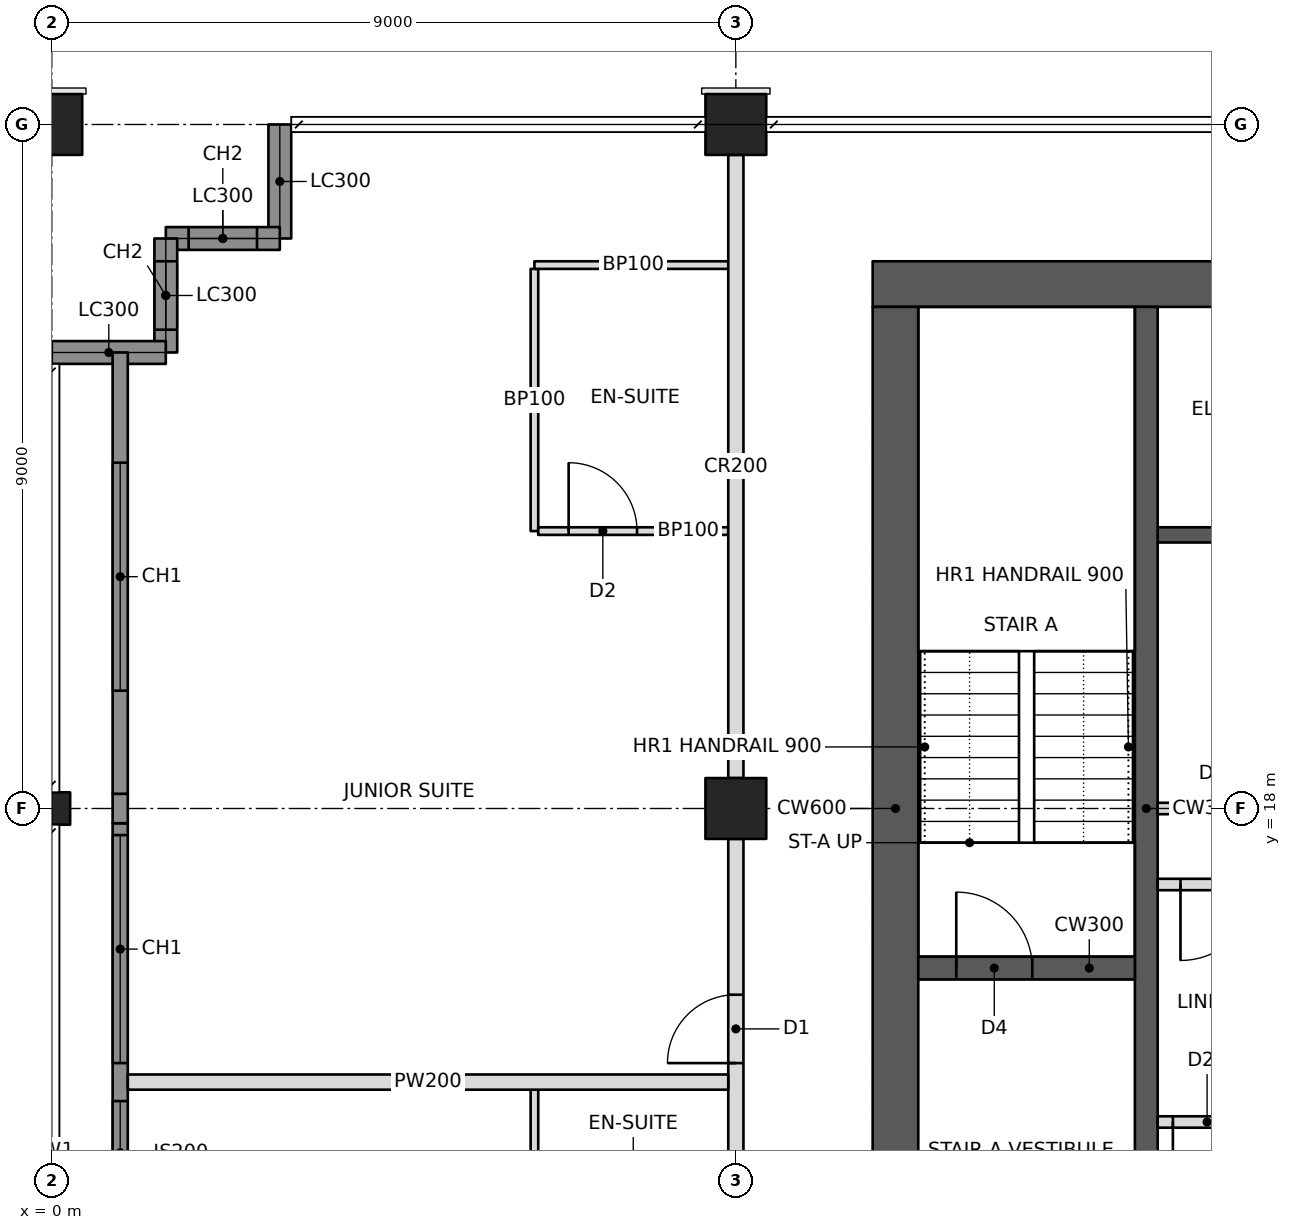
"""IFC4 building model, lengths in metres.
Left out: names, types, materials, properties, quantities, classifications, styles, units other than length and angle.
Written with IfcOpenShell. Run it as: python <this file> out.ifc"""

import sys

from ifc_helpers import new_model, si_unit, direction, frame, frame_2d, origin, origin_2d, place, context, subcontext, project, spatial, rectangle, hollow_rectangle, i_section, extrude, element, fill, save


model = new_model("IFC4")
c1 = context("Model", 3, precision=1e-05, world=origin(), true_north=direction((0.0, 1.0)))
c2 = subcontext(c1, "Body", "Model", "MODEL_VIEW")
j1 = project(units=[si_unit("LENGTHUNIT", "METRE"), si_unit("PLANEANGLEUNIT", "RADIAN")], contexts=[c1])
p1 = place(None, origin())
s1 = spatial("IfcSite", under=j1, at=p1, CompositionType="ELEMENT")
p2 = place(p1, origin())
s2 = spatial("IfcBuilding", under=s1, at=p2, CompositionType="ELEMENT")
p3 = place(p2, frame((0.0, 0.0, 204.6)))
s3 = spatial("IfcBuildingStorey", under=s2, at=p3, CompositionType="ELEMENT", Elevation=204.6)
p4 = place(p3, frame((0.0, 18.0, 0.0), z_axis=(0.0, 0.0, 1.0), x_axis=(0.0, 1.0, 0.0)))
e1 = element("IfcColumn", 1, at=p4, inside=s3, PredefinedType="COLUMN", context=c2, shape_type="SweptSolid", body=[
    extrude(i_section(OverallWidth=0.427, OverallDepth=0.483, WebThickness=0.051, FlangeThickness=0.082, at=origin_2d()), origin(), (0.0, 0.0, 1.0), 3.4),
])
p5 = place(p3, frame((0.0, 27.0, 0.0), z_axis=(0.0, 0.0, 1.0), x_axis=(0.0, 1.0, 0.0)))
e2 = element("IfcColumn", 2, at=p5, inside=s3, PredefinedType="COLUMN", context=c2, shape_type="SweptSolid", body=[
    extrude(hollow_rectangle(XDim=0.8, YDim=0.8, WallThickness=0.06, at=origin_2d()), origin(), (0.0, 0.0, 1.0), 3.4),
])
p6 = place(p3, frame((9.0, 18.0, 0.0), z_axis=(0.0, 0.0, 1.0), x_axis=(1.0, 0.0, 0.0)))
e3 = element("IfcColumn", 3, at=p6, inside=s3, PredefinedType="COLUMN", context=c2, shape_type="SweptSolid", body=[
    extrude(hollow_rectangle(XDim=0.8, YDim=0.8, WallThickness=0.05, at=origin_2d()), origin(), (0.0, 0.0, 1.0), 3.4),
])
p7 = place(p3, frame((9.0, 27.0, 0.0), z_axis=(0.0, 0.0, 1.0), x_axis=(1.0, 0.0, 0.0)))
e4 = element("IfcColumn", 4, at=p7, inside=s3, PredefinedType="COLUMN", context=c2, shape_type="SweptSolid", body=[
    extrude(hollow_rectangle(XDim=0.8, YDim=0.8, WallThickness=0.06, at=origin_2d()), origin(), (0.0, 0.0, 1.0), 3.4),
])
p8 = place(p3, frame((10.8, 24.9, 0.0), z_axis=(0.0, 0.0, 1.0), x_axis=(1.0, 0.0, 0.0)))
e5 = element("IfcWall", 5, at=p8, inside=s3, PredefinedType="SHEAR", context=c2, shape_type="SweptSolid", body=[
    extrude(rectangle(XDim=23.4, YDim=0.6, at=frame_2d((11.7, 0.0))), origin(), (0.0, 0.0, 1.0), 3.4),
])
p9 = place(p8, frame((17.2, 0.0, 0.0)))
e6 = element("IfcOpeningElement", 6, at=p9, cuts=e5, PredefinedType="OPENING", context=c2, shape_type="SweptSolid", body=[
    extrude(rectangle(XDim=1.8, YDim=2.1, at=frame_2d((0.9, 1.05))), frame((0.0, 0.31, 0.0), z_axis=(0.0, -1.0, 0.0), x_axis=(1.0, 0.0, 0.0)), (0.0, 0.0, 1.0), 0.62),
])
p10 = place(p8, frame((21.1, 0.0, 0.0)))
e7 = element("IfcOpeningElement", 7, at=p10, cuts=e5, PredefinedType="OPENING", context=c2, shape_type="SweptSolid", body=[
    extrude(rectangle(XDim=1.0, YDim=2.1, at=frame_2d((0.5, 1.05))), frame((0.0, 0.31, 0.0), z_axis=(0.0, -1.0, 0.0), x_axis=(1.0, 0.0, 0.0)), (0.0, 0.0, 1.0), 0.62),
])
p11 = place(p8, frame((4.9, 0.0, 0.0)))
e8 = element("IfcOpeningElement", 8, at=p11, cuts=e5, PredefinedType="OPENING", context=c2, shape_type="SweptSolid", body=[
    extrude(rectangle(XDim=1.0, YDim=2.1, at=frame_2d((0.5, 1.05))), frame((0.0, 0.31, 0.0), z_axis=(0.0, -1.0, 0.0), x_axis=(1.0, 0.0, 0.0)), (0.0, 0.0, 1.0), 0.62),
])
p12 = place(p3, frame((11.1, 11.4, 0.0), z_axis=(0.0, 0.0, 1.0), x_axis=(0.0, 1.0, 0.0)))
e9 = element("IfcWall", 9, at=p12, inside=s3, PredefinedType="SHEAR", context=c2, shape_type="SweptSolid", body=[
    extrude(rectangle(XDim=13.2, YDim=0.6, at=frame_2d((6.6, 0.0))), origin(), (0.0, 0.0, 1.0), 3.4),
])
p13 = place(p3, frame((14.4, 11.4, 0.0), z_axis=(0.0, 0.0, 1.0), x_axis=(0.0, 1.0, 0.0)))
e10 = element("IfcWall", 10, at=p13, inside=s3, PredefinedType="SHEAR", context=c2, shape_type="SweptSolid", body=[
    extrude(rectangle(XDim=13.2, YDim=0.3, at=frame_2d((6.6, 0.0))), origin(), (0.0, 0.0, 1.0), 3.4),
])
p14 = place(p3, frame((11.4, 15.9, 0.0), z_axis=(0.0, 0.0, 1.0), x_axis=(1.0, 0.0, 0.0)))
e11 = element("IfcWall", 11, at=p14, inside=s3, PredefinedType="SHEAR", context=c2, shape_type="SweptSolid", body=[
    extrude(rectangle(XDim=2.85, YDim=0.3, at=frame_2d((1.425, 0.0))), origin(), (0.0, 0.0, 1.0), 3.4),
])
p15 = place(p14, frame((0.5, 0.0, 0.0)))
e12 = element("IfcOpeningElement", 12, at=p15, cuts=e11, PredefinedType="OPENING", context=c2, shape_type="SweptSolid", body=[
    extrude(rectangle(XDim=1.0, YDim=2.1, at=frame_2d((0.5, 1.05))), frame((0.0, 0.16, 0.0), z_axis=(0.0, -1.0, 0.0), x_axis=(1.0, 0.0, 0.0)), (0.0, 0.0, 1.0), 0.32),
])
p16 = place(p3, frame((14.55, 18.0, 0.0), z_axis=(0.0, 0.0, 1.0), x_axis=(1.0, 0.0, 0.0)))
e13 = element("IfcWall", 13, at=p16, inside=s3, PredefinedType="PARTITIONING", context=c2, shape_type="SweptSolid", body=[
    extrude(rectangle(XDim=3.3, YDim=0.15, at=frame_2d((1.65, 0.0))), origin(), (0.0, 0.0, 1.0), 3.2),
])
p17 = place(p3, frame((14.55, 21.6, 0.0), z_axis=(0.0, 0.0, 1.0), x_axis=(1.0, 0.0, 0.0)))
e14 = element("IfcWall", 14, at=p17, inside=s3, PredefinedType="SHEAR", context=c2, shape_type="SweptSolid", body=[
    extrude(rectangle(XDim=3.3, YDim=0.2, at=frame_2d((1.65, 0.0))), origin(), (0.0, 0.0, 1.0), 3.4),
])
p18 = place(p3, frame((3.0, 27.0, 0.0), z_axis=(0.0, 0.0, 1.0), x_axis=(0.0, -1.0, 0.0)))
e15 = element("IfcWall", 15, at=p18, inside=s3, PredefinedType="SOLIDWALL", context=c2, shape_type="SweptSolid", body=[
    extrude(rectangle(XDim=1.5, YDim=0.3, at=frame_2d((0.75, 0.0))), origin(), (0.0, 0.0, 1.0), 2.42),
])
p19 = place(p3, frame((3.0, 25.5, 0.0), z_axis=(0.0, 0.0, 1.0), x_axis=(-1.0, 0.0, 0.0)))
e16 = element("IfcWall", 16, at=p19, inside=s3, PredefinedType="SOLIDWALL", context=c2, shape_type="SweptSolid", body=[
    extrude(rectangle(XDim=1.5, YDim=0.3, at=frame_2d((0.75, 0.0))), origin(), (0.0, 0.0, 1.0), 3.2),
])
p20 = place(p19, frame((0.3, 0.0, 0.6)))
e17 = element("IfcOpeningElement", 17, at=p20, cuts=e16, PredefinedType="OPENING", context=c2, shape_type="SweptSolid", body=[
    extrude(rectangle(XDim=0.9, YDim=2.2, at=frame_2d((0.45, 1.1))), frame((0.0, 0.16, 0.0), z_axis=(0.0, -1.0, 0.0), x_axis=(1.0, 0.0, 0.0)), (0.0, 0.0, 1.0), 0.32),
])
p21 = place(p3, frame((1.5, 25.5, 0.0), z_axis=(0.0, 0.0, 1.0), x_axis=(0.0, -1.0, 0.0)))
e18 = element("IfcWall", 18, at=p21, inside=s3, PredefinedType="SOLIDWALL", context=c2, shape_type="SweptSolid", body=[
    extrude(rectangle(XDim=1.5, YDim=0.3, at=frame_2d((0.75, 0.0))), origin(), (0.0, 0.0, 1.0), 3.2),
])
p22 = place(p21, frame((0.3, 0.0, 0.6)))
e19 = element("IfcOpeningElement", 19, at=p22, cuts=e18, PredefinedType="OPENING", context=c2, shape_type="SweptSolid", body=[
    extrude(rectangle(XDim=0.9, YDim=2.2, at=frame_2d((0.45, 1.1))), frame((0.0, 0.16, 0.0), z_axis=(0.0, -1.0, 0.0), x_axis=(1.0, 0.0, 0.0)), (0.0, 0.0, 1.0), 0.32),
])
p23 = place(p3, frame((1.5, 24.0, 0.0), z_axis=(0.0, 0.0, 1.0), x_axis=(-1.0, 0.0, 0.0)))
e20 = element("IfcWall", 20, at=p23, inside=s3, PredefinedType="SOLIDWALL", context=c2, shape_type="SweptSolid", body=[
    extrude(rectangle(XDim=1.5, YDim=0.3, at=frame_2d((0.75, 0.0))), origin(), (0.0, 0.0, 1.0), 2.42),
])
p24 = place(p3, frame((9.0, 10.8, 0.0), z_axis=(0.0, 0.0, 1.0), x_axis=(0.0, 1.0, 0.0)))
e21 = element("IfcWall", 21, at=p24, inside=s3, PredefinedType="PARTITIONING", context=c2, shape_type="SweptSolid", body=[
    extrude(rectangle(XDim=6.8, YDim=0.2, at=frame_2d((3.4, 0.0))), origin(), (0.0, 0.0, 1.0), 2.405),
])
p25 = place(p24, frame((0.25, 0.0, 0.0)))
e22 = element("IfcOpeningElement", 22, at=p25, cuts=e21, PredefinedType="OPENING", context=c2, shape_type="SweptSolid", body=[
    extrude(rectangle(XDim=0.9, YDim=2.1, at=frame_2d((0.45, 1.05))), frame((0.0, 0.11, 0.0), z_axis=(0.0, -1.0, 0.0), x_axis=(1.0, 0.0, 0.0)), (0.0, 0.0, 1.0), 0.22),
])
p26 = place(p24, frame((3.85, 0.0, 0.0)))
e23 = element("IfcOpeningElement", 23, at=p26, cuts=e21, PredefinedType="OPENING", context=c2, shape_type="SweptSolid", body=[
    extrude(rectangle(XDim=0.9, YDim=2.1, at=frame_2d((0.45, 1.05))), frame((0.0, 0.11, 0.0), z_axis=(0.0, -1.0, 0.0), x_axis=(1.0, 0.0, 0.0)), (0.0, 0.0, 1.0), 0.22),
])
p27 = place(p3, frame((9.0, 18.4, 0.0), z_axis=(0.0, 0.0, 1.0), x_axis=(0.0, 1.0, 0.0)))
e24 = element("IfcWall", 24, at=p27, inside=s3, PredefinedType="PARTITIONING", context=c2, shape_type="SweptSolid", body=[
    extrude(rectangle(XDim=8.2, YDim=0.2, at=frame_2d((4.1, 0.0))), origin(), (0.0, 0.0, 1.0), 2.405),
])
p28 = place(p3, frame((8.9, 14.4, 0.0), z_axis=(0.0, 0.0, 1.0), x_axis=(-1.0, 0.0, 0.0)))
e25 = element("IfcWall", 25, at=p28, inside=s3, PredefinedType="PARTITIONING", context=c2, shape_type="SweptSolid", body=[
    extrude(rectangle(XDim=7.9, YDim=0.2, at=frame_2d((3.95, 0.0))), origin(), (0.0, 0.0, 1.0), 2.404),
])
p29 = place(p3, frame((6.35, 12.25, 0.0), z_axis=(0.0, 0.0, 1.0), x_axis=(0.0, 1.0, 0.0)))
e26 = element("IfcWall", 26, at=p29, inside=s3, PredefinedType="PARTITIONING", context=c2, shape_type="SweptSolid", body=[
    extrude(rectangle(XDim=2.05, YDim=0.1, at=frame_2d((1.025, 0.0))), origin(), (0.0, 0.0, 1.0), 3.2),
])
p30 = place(p3, frame((6.35, 21.65, 0.0), z_axis=(0.0, 0.0, 1.0), x_axis=(0.0, 1.0, 0.0)))
e27 = element("IfcWall", 27, at=p30, inside=s3, PredefinedType="PARTITIONING", context=c2, shape_type="SweptSolid", body=[
    extrude(rectangle(XDim=3.45, YDim=0.1, at=frame_2d((1.725, 0.0))), origin(), (0.0, 0.0, 1.0), 3.2),
])
p31 = place(p3, frame((8.9, 21.65, 0.0), z_axis=(0.0, 0.0, 1.0), x_axis=(-1.0, 0.0, 0.0)))
e28 = element("IfcWall", 28, at=p31, inside=s3, PredefinedType="PARTITIONING", context=c2, shape_type="SweptSolid", body=[
    extrude(rectangle(XDim=2.5, YDim=0.1, at=frame_2d((1.25, 0.0))), origin(), (0.0, 0.0, 1.0), 2.404),
])
p32 = place(p31, frame((1.2, 0.0, 0.0)))
e29 = element("IfcOpeningElement", 29, at=p32, cuts=e28, PredefinedType="OPENING", context=c2, shape_type="SweptSolid", body=[
    extrude(rectangle(XDim=0.9, YDim=2.1, at=frame_2d((0.45, 1.05))), frame((0.0, 0.06, 0.0), z_axis=(0.0, -1.0, 0.0), x_axis=(1.0, 0.0, 0.0)), (0.0, 0.0, 1.0), 0.12),
])
p33 = place(p3, frame((6.35, 25.15, 0.0), z_axis=(0.0, 0.0, 1.0), x_axis=(1.0, 0.0, 0.0)))
e30 = element("IfcWall", 30, at=p33, inside=s3, PredefinedType="PARTITIONING", context=c2, shape_type="SweptSolid", body=[
    extrude(rectangle(XDim=2.6, YDim=0.1, at=frame_2d((1.3, 0.0))), origin(), (0.0, 0.0, 1.0), 2.404),
])
p34 = place(p3, frame((14.55, 17.0, 0.0), z_axis=(0.0, 0.0, 1.0), x_axis=(1.0, 0.0, 0.0)))
e31 = element("IfcWall", 31, at=p34, inside=s3, PredefinedType="PARTITIONING", context=c2, shape_type="SweptSolid", body=[
    extrude(rectangle(XDim=3.3, YDim=0.15, at=frame_2d((1.65, 0.0))), origin(), (0.0, 0.0, 1.0), 3.2),
])
p35 = place(p34, frame((0.3, 0.0, 0.0)))
e32 = element("IfcOpeningElement", 32, at=p35, cuts=e31, PredefinedType="OPENING", context=c2, shape_type="SweptSolid", body=[
    extrude(rectangle(XDim=1.0, YDim=2.1, at=frame_2d((0.5, 1.05))), frame((0.0, 0.085, 0.0), z_axis=(0.0, -1.0, 0.0), x_axis=(1.0, 0.0, 0.0)), (0.0, 0.0, 1.0), 0.17),
])
p36 = place(p3, frame((14.55, 13.875, 0.0), z_axis=(0.0, 0.0, 1.0), x_axis=(1.0, 0.0, 0.0)))
e33 = element("IfcWall", 33, at=p36, inside=s3, PredefinedType="PARTITIONING", context=c2, shape_type="SweptSolid", body=[
    extrude(rectangle(XDim=3.3, YDim=0.15, at=frame_2d((1.65, 0.0))), origin(), (0.0, 0.0, 1.0), 3.2),
])
p37 = place(p36, frame((0.2, 0.0, 0.0)))
e34 = element("IfcOpeningElement", 34, at=p37, cuts=e33, PredefinedType="OPENING", context=c2, shape_type="SweptSolid", body=[
    extrude(rectangle(XDim=0.9, YDim=2.1, at=frame_2d((0.45, 1.05))), frame((0.0, 0.085, 0.0), z_axis=(0.0, -1.0, 0.0), x_axis=(1.0, 0.0, 0.0)), (0.0, 0.0, 1.0), 0.17),
])
p38 = place(p36, frame((1.8, 0.0, 0.0)))
e35 = element("IfcOpeningElement", 35, at=p38, cuts=e33, PredefinedType="OPENING", context=c2, shape_type="SweptSolid", body=[
    extrude(rectangle(XDim=0.9, YDim=2.1, at=frame_2d((0.45, 1.05))), frame((0.0, 0.085, 0.0), z_axis=(0.0, -1.0, 0.0), x_axis=(1.0, 0.0, 0.0)), (0.0, 0.0, 1.0), 0.17),
])
p39 = place(p3, frame((0.9, 9.135, 0.0), z_axis=(0.0, 0.0, 1.0), x_axis=(0.0, 1.0, 0.0)))
e36 = element("IfcWall", 36, at=p39, inside=s3, PredefinedType="SOLIDWALL", context=c2, shape_type="SweptSolid", body=[
    extrude(rectangle(XDim=8.671, YDim=0.2, at=frame_2d((4.335, 0.0))), origin(), (0.0, 0.0, 1.0), 3.2),
])
p40 = place(p39, frame((2.015, 0.0, 0.6)))
e37 = element("IfcOpeningElement", 37, at=p40, cuts=e36, PredefinedType="OPENING", context=c2, shape_type="SweptSolid", body=[
    extrude(rectangle(XDim=3.0, YDim=2.2, at=frame_2d((1.5, 1.1))), frame((0.0, 0.11, 0.0), z_axis=(0.0, -1.0, 0.0), x_axis=(1.0, 0.0, 0.0)), (0.0, 0.0, 1.0), 0.22),
])
p41 = place(p39, frame((5.515, 0.0, 0.6)))
e38 = element("IfcOpeningElement", 38, at=p41, cuts=e36, PredefinedType="OPENING", context=c2, shape_type="SweptSolid", body=[
    extrude(rectangle(XDim=3.0, YDim=2.2, at=frame_2d((1.5, 1.1))), frame((0.0, 0.11, 0.0), z_axis=(0.0, -1.0, 0.0), x_axis=(1.0, 0.0, 0.0)), (0.0, 0.0, 1.0), 0.22),
])
p42 = place(p3, frame((0.9, 17.806, 0.0), z_axis=(0.0, 0.0, 1.0), x_axis=(0.0, 1.0, 0.0)))
e39 = element("IfcWall", 39, at=p42, inside=s3, PredefinedType="SOLIDWALL", context=c2, shape_type="SweptSolid", body=[
    extrude(rectangle(XDim=0.388, YDim=0.2, at=frame_2d((0.194, 0.0))), origin(), (0.0, 0.0, 1.0), 2.404),
])
p43 = place(p3, frame((0.9, 18.194, 0.0), z_axis=(0.0, 0.0, 1.0), x_axis=(0.0, 1.0, 0.0)))
e40 = element("IfcWall", 40, at=p43, inside=s3, PredefinedType="SOLIDWALL", context=c2, shape_type="SweptSolid", body=[
    extrude(rectangle(XDim=5.806, YDim=0.2, at=frame_2d((2.903, 0.0))), origin(), (0.0, 0.0, 1.0), 3.2),
])
p44 = place(p43, frame((1.356, 0.0, 0.6)))
e41 = element("IfcOpeningElement", 41, at=p44, cuts=e40, PredefinedType="OPENING", context=c2, shape_type="SweptSolid", body=[
    extrude(rectangle(XDim=3.0, YDim=2.2, at=frame_2d((1.5, 1.1))), frame((0.0, 0.11, 0.0), z_axis=(0.0, -1.0, 0.0), x_axis=(1.0, 0.0, 0.0)), (0.0, 0.0, 1.0), 0.22),
])
p45 = place(p20, origin())
e42 = element("IfcWindow", 42, at=p45, inside=s3, PartitioningType="SINGLE_PANEL", PredefinedType="WINDOW", context=c2, shape_type="SweptSolid", body=[
    extrude(rectangle(XDim=0.9, YDim=2.2, at=frame_2d((0.45, 1.1))), frame((0.0, 0.03, 0.0), z_axis=(0.0, -1.0, 0.0), x_axis=(1.0, 0.0, 0.0)), (0.0, 0.0, 1.0), 0.06),
])
fill(e17, e42)
p46 = place(p22, origin())
e43 = element("IfcWindow", 43, at=p46, inside=s3, PartitioningType="SINGLE_PANEL", PredefinedType="WINDOW", context=c2, shape_type="SweptSolid", body=[
    extrude(rectangle(XDim=0.9, YDim=2.2, at=frame_2d((0.45, 1.1))), frame((0.0, 0.03, 0.0), z_axis=(0.0, -1.0, 0.0), x_axis=(1.0, 0.0, 0.0)), (0.0, 0.0, 1.0), 0.06),
])
fill(e19, e43)
p47 = place(p40, origin())
e44 = element("IfcWindow", 44, at=p47, inside=s3, PartitioningType="TRIPLE_PANEL_VERTICAL", PredefinedType="WINDOW", context=c2, shape_type="SweptSolid", body=[
    extrude(rectangle(XDim=3.0, YDim=2.2, at=frame_2d((1.5, 1.1))), frame((0.0, 0.03, 0.0), z_axis=(0.0, -1.0, 0.0), x_axis=(1.0, 0.0, 0.0)), (0.0, 0.0, 1.0), 0.06),
])
fill(e37, e44)
p48 = place(p41, origin())
e45 = element("IfcWindow", 45, at=p48, inside=s3, PartitioningType="TRIPLE_PANEL_VERTICAL", PredefinedType="WINDOW", context=c2, shape_type="SweptSolid", body=[
    extrude(rectangle(XDim=3.0, YDim=2.2, at=frame_2d((1.5, 1.1))), frame((0.0, 0.03, 0.0), z_axis=(0.0, -1.0, 0.0), x_axis=(1.0, 0.0, 0.0)), (0.0, 0.0, 1.0), 0.06),
])
fill(e38, e45)
p49 = place(p44, origin())
e46 = element("IfcWindow", 46, at=p49, inside=s3, PartitioningType="TRIPLE_PANEL_VERTICAL", PredefinedType="WINDOW", context=c2, shape_type="SweptSolid", body=[
    extrude(rectangle(XDim=3.0, YDim=2.2, at=frame_2d((1.5, 1.1))), frame((0.0, 0.03, 0.0), z_axis=(0.0, -1.0, 0.0), x_axis=(1.0, 0.0, 0.0)), (0.0, 0.0, 1.0), 0.06),
])
fill(e41, e46)
p50 = place(p32, frame((0.9, 0.0, 0.0), z_axis=(0.0, 0.0, 1.0), x_axis=(-1.0, 0.0, 0.0)))
e47 = element("IfcDoor", 47, at=p50, inside=s3, OperationType="SINGLE_SWING_LEFT", PredefinedType="DOOR", context=c2, shape_type="SweptSolid", body=[
    extrude(rectangle(XDim=0.9, YDim=2.1, at=frame_2d((0.45, 1.05))), frame((0.0, 0.025, 0.0), z_axis=(0.0, -1.0, 0.0), x_axis=(1.0, 0.0, 0.0)), (0.0, 0.0, 1.0), 0.05),
])
fill(e29, e47)
p51 = place(p26, origin())
e48 = element("IfcDoor", 48, at=p51, inside=s3, OperationType="SINGLE_SWING_LEFT", PredefinedType="DOOR", context=c2, shape_type="SweptSolid", body=[
    extrude(rectangle(XDim=0.9, YDim=2.1, at=frame_2d((0.45, 1.05))), frame((0.0, 0.025, 0.0), z_axis=(0.0, -1.0, 0.0), x_axis=(1.0, 0.0, 0.0)), (0.0, 0.0, 1.0), 0.05),
])
fill(e23, e48)
p52 = place(p35, frame((1.0, 0.0, 0.0), z_axis=(0.0, 0.0, 1.0), x_axis=(-1.0, 0.0, 0.0)))
e49 = element("IfcDoor", 49, at=p52, inside=s3, OperationType="SINGLE_SWING_RIGHT", PredefinedType="DOOR", context=c2, shape_type="SweptSolid", body=[
    extrude(rectangle(XDim=1.0, YDim=2.1, at=frame_2d((0.5, 1.05))), frame((0.0, 0.025, 0.0), z_axis=(0.0, -1.0, 0.0), x_axis=(1.0, 0.0, 0.0)), (0.0, 0.0, 1.0), 0.05),
])
fill(e32, e49)
p53 = place(p37, frame((0.9, 0.0, 0.0), z_axis=(0.0, 0.0, 1.0), x_axis=(-1.0, 0.0, 0.0)))
e50 = element("IfcDoor", 50, at=p53, inside=s3, OperationType="SINGLE_SWING_RIGHT", PredefinedType="DOOR", context=c2, shape_type="SweptSolid", body=[
    extrude(rectangle(XDim=0.9, YDim=2.1, at=frame_2d((0.45, 1.05))), frame((0.0, 0.025, 0.0), z_axis=(0.0, -1.0, 0.0), x_axis=(1.0, 0.0, 0.0)), (0.0, 0.0, 1.0), 0.05),
])
fill(e34, e50)
p54 = place(p15, origin())
e51 = element("IfcDoor", 51, at=p54, inside=s3, OperationType="SINGLE_SWING_LEFT", PredefinedType="DOOR", context=c2, shape_type="SweptSolid", body=[
    extrude(rectangle(XDim=1.0, YDim=2.1, at=frame_2d((0.5, 1.05))), frame((0.0, 0.025, 0.0), z_axis=(0.0, -1.0, 0.0), x_axis=(1.0, 0.0, 0.0)), (0.0, 0.0, 1.0), 0.05),
])
fill(e12, e51)
save(model, sys.argv[1])
